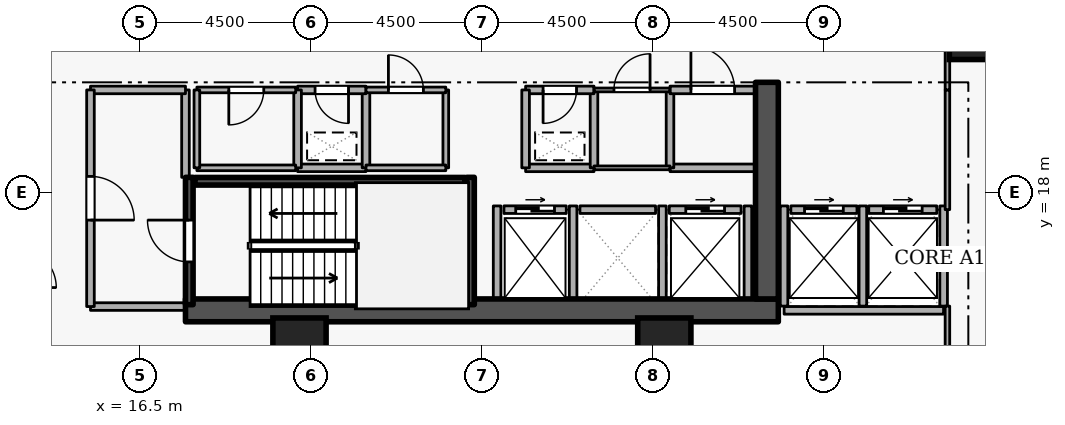
"""IFC4 building model, lengths in metres.
Left out: names, types, materials, properties, quantities, classifications, styles, units other than length and angle.
Written with IfcOpenShell. Run it as: python <this file> out.ifc"""

import sys

from ifc_helpers import new_model, si_unit, direction, frame, frame_2d, origin, origin_2d, place, context, subcontext, project, spatial, rectangle, extrude, element, fill, save


model = new_model("IFC4")
c1 = context("Model", 3, precision=1e-05, world=origin(), true_north=direction((0.0, 1.0)))
c2 = subcontext(c1, "Body", "Model", "MODEL_VIEW")
j1 = project(units=[si_unit("LENGTHUNIT", "METRE"), si_unit("PLANEANGLEUNIT", "RADIAN")], contexts=[c1])
p1 = place(None, origin())
s1 = spatial("IfcSite", under=j1, at=p1, CompositionType="ELEMENT")
p2 = place(p1, origin())
s2 = spatial("IfcBuilding", under=s1, at=p2, CompositionType="ELEMENT")
p3 = place(p2, frame((0.0, 0.0, 31.5)))
s3 = spatial("IfcBuildingStorey", under=s2, at=p3, CompositionType="ELEMENT", Elevation=31.5)
p4 = place(p3, frame((17.7, 14.9, 0.0), z_axis=(0.0, 0.0, 1.0), x_axis=(1.0, 0.0, 0.0)))
e1 = element("IfcWall", 1, at=p4, inside=s3, PredefinedType="SHEAR", context=c2, shape_type="SweptSolid", body=[
    extrude(rectangle(XDim=15.6, YDim=0.6, at=frame_2d((7.8, 0.0))), origin(), (0.0, 0.0, 1.0), 3.6),
])
p5 = place(p3, frame((33.0, 15.2, 0.0), z_axis=(0.0, 0.0, 1.0), x_axis=(0.0, 1.0, 0.0)))
e2 = element("IfcWall", 2, at=p5, inside=s3, PredefinedType="SHEAR", context=c2, shape_type="SweptSolid", body=[
    extrude(rectangle(XDim=5.7, YDim=0.6, at=frame_2d((2.85, 0.0))), origin(), (0.0, 0.0, 1.0), 3.6),
])
for number, where, z_axis, x_axis in (
    (3, (38.5, 22.2, 0.0), (0.0, 0.0, 1.0), (1.0, 0.0, 0.0)),
    (4, (20.7, 14.0, 0.0), (0.0, 0.0, 1.0), (1.0, 0.0, 0.0)),
    (5, (30.3, 14.0, 0.0), (0.0, 0.0, 1.0), (1.0, 0.0, 0.0)),
):
    element("IfcColumn", number, at=place(p3, frame(where, z_axis=z_axis, x_axis=x_axis)), inside=s3, PredefinedType="COLUMN", context=c2, shape_type="SweptSolid", body=[
        extrude(rectangle(XDim=1.4, YDim=1.4, at=origin_2d()), origin(), (0.0, 0.0, 1.0), 3.6),
    ])
p6 = place(p3, frame((26.08, 17.55, 0.0), z_axis=(0.0, 0.0, 1.0), x_axis=(1.0, 0.0, 0.0)))
e6 = element("IfcWall", 6, at=p6, inside=s3, PredefinedType="STANDARD", context=c2, shape_type="SweptSolid", body=[
    extrude(rectangle(XDim=1.64, YDim=0.2, at=frame_2d((0.82, 0.0))), origin(), (0.0, 0.0, 1.0), 3.34),
])
p7 = place(p6, frame((0.31, 0.0, 0.0)))
e7 = element("IfcOpeningElement", 7, at=p7, cuts=e6, PredefinedType="OPENING", context=c2, shape_type="SweptSolid", body=[
    extrude(rectangle(XDim=1.02, YDim=2.06, at=frame_2d((0.51, 1.03))), frame((0.0, 0.11, 0.0), z_axis=(0.0, -1.0, 0.0), x_axis=(1.0, 0.0, 0.0)), (0.0, 0.0, 1.0), 0.22),
])
p8 = place(p3, frame((28.08, 17.55, 0.0), z_axis=(0.0, 0.0, 1.0), x_axis=(1.0, 0.0, 0.0)))
e8 = element("IfcWall", 8, at=p8, inside=s3, PredefinedType="STANDARD", context=c2, shape_type="SweptSolid", body=[
    extrude(rectangle(XDim=1.99, YDim=0.2, at=frame_2d((0.995, 0.0))), origin(), (0.0, 0.0, 1.0), 3.34),
])
p9 = place(p3, frame((30.43, 17.55, 0.0), z_axis=(0.0, 0.0, 1.0), x_axis=(1.0, 0.0, 0.0)))
e9 = element("IfcWall", 9, at=p9, inside=s3, PredefinedType="STANDARD", context=c2, shape_type="SweptSolid", body=[
    extrude(rectangle(XDim=1.89, YDim=0.2, at=frame_2d((0.945, 0.0))), origin(), (0.0, 0.0, 1.0), 3.34),
])
p10 = place(p9, frame((0.435, 0.0, 0.0)))
e10 = element("IfcOpeningElement", 10, at=p10, cuts=e9, PredefinedType="OPENING", context=c2, shape_type="SweptSolid", body=[
    extrude(rectangle(XDim=1.02, YDim=2.06, at=frame_2d((0.51, 1.03))), frame((0.0, 0.11, 0.0), z_axis=(0.0, -1.0, 0.0), x_axis=(1.0, 0.0, 0.0)), (0.0, 0.0, 1.0), 0.22),
])
p11 = place(p3, frame((33.63, 17.55, 0.0), z_axis=(0.0, 0.0, 1.0), x_axis=(1.0, 0.0, 0.0)))
e11 = element("IfcWall", 11, at=p11, inside=s3, PredefinedType="STANDARD", context=c2, shape_type="SweptSolid", body=[
    extrude(rectangle(XDim=1.74, YDim=0.2, at=frame_2d((0.87, 0.0))), origin(), (0.0, 0.0, 1.0), 3.34),
])
p12 = place(p11, frame((0.36, 0.0, 0.0)))
e12 = element("IfcOpeningElement", 12, at=p12, cuts=e11, PredefinedType="OPENING", context=c2, shape_type="SweptSolid", body=[
    extrude(rectangle(XDim=1.02, YDim=2.06, at=frame_2d((0.51, 1.03))), frame((0.0, 0.11, 0.0), z_axis=(0.0, -1.0, 0.0), x_axis=(1.0, 0.0, 0.0)), (0.0, 0.0, 1.0), 0.22),
])
p13 = place(p3, frame((35.68, 17.55, 0.0), z_axis=(0.0, 0.0, 1.0), x_axis=(1.0, 0.0, 0.0)))
e13 = element("IfcWall", 13, at=p13, inside=s3, PredefinedType="STANDARD", context=c2, shape_type="SweptSolid", body=[
    extrude(rectangle(XDim=1.79, YDim=0.2, at=frame_2d((0.895, 0.0))), origin(), (0.0, 0.0, 1.0), 3.34),
])
p14 = place(p13, frame((0.385, 0.0, 0.0)))
e14 = element("IfcOpeningElement", 14, at=p14, cuts=e13, PredefinedType="OPENING", context=c2, shape_type="SweptSolid", body=[
    extrude(rectangle(XDim=1.02, YDim=2.06, at=frame_2d((0.51, 1.03))), frame((0.0, 0.11, 0.0), z_axis=(0.0, -1.0, 0.0), x_axis=(1.0, 0.0, 0.0)), (0.0, 0.0, 1.0), 0.22),
])
for number, where, z_axis, x_axis in (
    (15, (27.9, 15.212, 0.0), (0.0, 0.0, 1.0), (0.0, 1.0, 0.0)),
    (16, (25.9, 15.212, 0.0), (0.0, 0.0, 1.0), (0.0, 1.0, 0.0)),
    (17, (30.25, 15.212, 0.0), (0.0, 0.0, 1.0), (0.0, 1.0, 0.0)),
    (18, (32.5, 15.212, 0.0), (0.0, 0.0, 1.0), (0.0, 1.0, 0.0)),
):
    element("IfcWall", number, at=place(p3, frame(where, z_axis=z_axis, x_axis=x_axis)), inside=s3, PredefinedType="STANDARD", context=c2, shape_type="SweptSolid", body=[
        extrude(rectangle(XDim=2.436, YDim=0.2, at=frame_2d((1.218, 0.0))), origin(), (0.0, 0.0, 1.0), 3.34),
    ])
p15 = place(p3, frame((33.452, 14.9, 0.0), z_axis=(0.0, 0.0, 1.0), x_axis=(1.0, 0.0, 0.0)))
e19 = element("IfcWall", 19, at=p15, inside=s3, PredefinedType="STANDARD", context=c2, shape_type="SweptSolid", body=[
    extrude(rectangle(XDim=4.196, YDim=0.2, at=frame_2d((2.098, 0.0))), origin(), (0.0, 0.0, 1.0), 3.34),
])
for number, where, z_axis, x_axis in (
    (20, (35.525, 15.012, 0.0), (0.0, 0.0, 1.0), (0.0, 1.0, 0.0)),
    (21, (33.45, 15.012, 0.0), (0.0, 0.0, 1.0), (0.0, 1.0, 0.0)),
    (22, (37.65, 15.012, 0.0), (0.0, 0.0, 1.0), (0.0, 1.0, 0.0)),
):
    element("IfcWall", number, at=place(p3, frame(where, z_axis=z_axis, x_axis=x_axis)), inside=s3, PredefinedType="STANDARD", context=c2, shape_type="SweptSolid", body=[
        extrude(rectangle(XDim=2.636, YDim=0.2, at=frame_2d((1.318, 0.0))), origin(), (0.0, 0.0, 1.0), 3.34),
    ])
p16 = place(p3, frame((17.8, 15.05, 0.0), z_axis=(0.0, 0.0, 1.0), x_axis=(0.0, 1.0, 0.0)))
e23 = element("IfcWall", 23, at=p16, inside=s3, PredefinedType="SHEAR", context=c2, shape_type="SweptSolid", body=[
    extrude(rectangle(XDim=3.35, YDim=0.2, at=frame_2d((1.675, 0.0))), origin(), (0.0, 0.0, 1.0), 3.6),
])
p17 = place(p16, frame((1.125, 0.0, 0.0)))
e24 = element("IfcOpeningElement", 24, at=p17, cuts=e23, PredefinedType="OPENING", context=c2, shape_type="SweptSolid", body=[
    extrude(rectangle(XDim=1.1, YDim=2.1, at=frame_2d((0.55, 1.05))), frame((0.0, 0.11, 0.0), z_axis=(0.0, -1.0, 0.0), x_axis=(1.0, 0.0, 0.0)), (0.0, 0.0, 1.0), 0.22),
])
p18 = place(p3, frame((25.2, 18.4, 0.0), z_axis=(0.0, 0.0, 1.0), x_axis=(0.0, -1.0, 0.0)))
e25 = element("IfcWall", 25, at=p18, inside=s3, PredefinedType="SHEAR", context=c2, shape_type="SweptSolid", body=[
    extrude(rectangle(XDim=3.35, YDim=0.2, at=frame_2d((1.675, 0.0))), origin(), (0.0, 0.0, 1.0), 3.6),
])
p19 = place(p3, frame((25.05, 18.297, 0.0), z_axis=(0.0, 0.0, 1.0), x_axis=(-1.0, 0.0, 0.0)))
e26 = element("IfcWall", 26, at=p19, inside=s3, PredefinedType="SHEAR", context=c2, shape_type="SweptSolid", body=[
    extrude(rectangle(XDim=7.1, YDim=0.2, at=frame_2d((3.55, 0.0))), origin(), (0.0, 0.0, 1.0), 3.6),
])
p20 = place(p3, frame((15.2, 15.0, 0.0), z_axis=(0.0, 0.0, 1.0), x_axis=(1.0, 0.0, 0.0)))
e27 = element("IfcWall", 27, at=p20, inside=s3, PredefinedType="STANDARD", context=c2, shape_type="SweptSolid", body=[
    extrude(rectangle(XDim=2.5, YDim=0.2, at=frame_2d((1.25, 0.0))), origin(), (0.0, 0.0, 1.0), 3.34),
])
p21 = place(p3, frame((17.7, 18.4, 0.0), z_axis=(0.0, 0.0, 1.0), x_axis=(0.0, 1.0, 0.0)))
e28 = element("IfcWall", 28, at=p21, inside=s3, PredefinedType="STANDARD", context=c2, shape_type="SweptSolid", body=[
    extrude(rectangle(XDim=2.3, YDim=0.2, at=frame_2d((1.15, 0.0))), origin(), (0.0, 0.0, 1.0), 2.545),
])
p22 = place(p3, frame((17.7, 20.7, 0.0), z_axis=(0.0, 0.0, 1.0), x_axis=(-1.0, 0.0, 0.0)))
e29 = element("IfcWall", 29, at=p22, inside=s3, PredefinedType="STANDARD", context=c2, shape_type="SweptSolid", body=[
    extrude(rectangle(XDim=2.5, YDim=0.2, at=frame_2d((1.25, 0.0))), origin(), (0.0, 0.0, 1.0), 3.34),
])
p23 = place(p3, frame((15.2, 20.7, 0.0), z_axis=(0.0, 0.0, 1.0), x_axis=(0.0, -1.0, 0.0)))
e30 = element("IfcWall", 30, at=p23, inside=s3, PredefinedType="STANDARD", context=c2, shape_type="SweptSolid", body=[
    extrude(rectangle(XDim=5.7, YDim=0.2, at=frame_2d((2.85, 0.0))), origin(), (0.0, 0.0, 1.0), 3.34),
])
p24 = place(p23, frame((2.275, 0.0, 0.0)))
e31 = element("IfcOpeningElement", 31, at=p24, cuts=e30, PredefinedType="OPENING", context=c2, shape_type="SweptSolid", body=[
    extrude(rectangle(XDim=1.15, YDim=2.1, at=frame_2d((0.575, 1.05))), frame((0.0, 0.11, 0.0), z_axis=(0.0, -1.0, 0.0), x_axis=(1.0, 0.0, 0.0)), (0.0, 0.0, 1.0), 0.22),
])
p25 = place(p3, frame((26.65, 18.65, 0.0), z_axis=(0.0, 0.0, 1.0), x_axis=(1.0, 0.0, 0.0)))
e32 = element("IfcWall", 32, at=p25, inside=s3, PredefinedType="STANDARD", context=c2, shape_type="SweptSolid", body=[
    extrude(rectangle(XDim=1.8, YDim=0.2, at=frame_2d((0.9, 0.0))), origin(), (0.0, 0.0, 1.0), 3.34),
])
p26 = place(p3, frame((28.45, 18.65, 0.0), z_axis=(0.0, 0.0, 1.0), x_axis=(0.0, 1.0, 0.0)))
e33 = element("IfcWall", 33, at=p26, inside=s3, PredefinedType="STANDARD", context=c2, shape_type="SweptSolid", body=[
    extrude(rectangle(XDim=2.05, YDim=0.2, at=frame_2d((1.025, 0.0))), origin(), (0.0, 0.0, 1.0), 3.34),
])
p27 = place(p3, frame((28.45, 20.7, 0.0), z_axis=(0.0, 0.0, 1.0), x_axis=(-1.0, 0.0, 0.0)))
e34 = element("IfcWall", 34, at=p27, inside=s3, PredefinedType="STANDARD", context=c2, shape_type="SweptSolid", body=[
    extrude(rectangle(XDim=1.8, YDim=0.2, at=frame_2d((0.9, 0.0))), origin(), (0.0, 0.0, 1.0), 3.34),
])
p28 = place(p27, frame((0.46, 0.0, 0.0)))
e35 = element("IfcOpeningElement", 35, at=p28, cuts=e34, PredefinedType="OPENING", context=c2, shape_type="SweptSolid", body=[
    extrude(rectangle(XDim=0.88, YDim=2.04, at=frame_2d((0.44, 1.02))), frame((0.0, 0.11, 0.0), z_axis=(0.0, -1.0, 0.0), x_axis=(1.0, 0.0, 0.0)), (0.0, 0.0, 1.0), 0.22),
])
p29 = place(p3, frame((26.65, 20.7, 0.0), z_axis=(0.0, 0.0, 1.0), x_axis=(0.0, -1.0, 0.0)))
e36 = element("IfcWall", 36, at=p29, inside=s3, PredefinedType="STANDARD", context=c2, shape_type="SweptSolid", body=[
    extrude(rectangle(XDim=2.05, YDim=0.2, at=frame_2d((1.025, 0.0))), origin(), (0.0, 0.0, 1.0), 3.34),
])
p30 = place(p3, frame((20.65, 18.65, 0.0), z_axis=(0.0, 0.0, 1.0), x_axis=(1.0, 0.0, 0.0)))
e37 = element("IfcWall", 37, at=p30, inside=s3, PredefinedType="STANDARD", context=c2, shape_type="SweptSolid", body=[
    extrude(rectangle(XDim=1.8, YDim=0.2, at=frame_2d((0.9, 0.0))), origin(), (0.0, 0.0, 1.0), 3.34),
])
p31 = place(p3, frame((22.45, 18.65, 0.0), z_axis=(0.0, 0.0, 1.0), x_axis=(0.0, 1.0, 0.0)))
e38 = element("IfcWall", 38, at=p31, inside=s3, PredefinedType="STANDARD", context=c2, shape_type="SweptSolid", body=[
    extrude(rectangle(XDim=2.05, YDim=0.2, at=frame_2d((1.025, 0.0))), origin(), (0.0, 0.0, 1.0), 3.34),
])
p32 = place(p3, frame((22.45, 20.7, 0.0), z_axis=(0.0, 0.0, 1.0), x_axis=(-1.0, 0.0, 0.0)))
e39 = element("IfcWall", 39, at=p32, inside=s3, PredefinedType="STANDARD", context=c2, shape_type="SweptSolid", body=[
    extrude(rectangle(XDim=1.8, YDim=0.2, at=frame_2d((0.9, 0.0))), origin(), (0.0, 0.0, 1.0), 3.34),
])
p33 = place(p32, frame((0.46, 0.0, 0.0)))
e40 = element("IfcOpeningElement", 40, at=p33, cuts=e39, PredefinedType="OPENING", context=c2, shape_type="SweptSolid", body=[
    extrude(rectangle(XDim=0.88, YDim=2.04, at=frame_2d((0.44, 1.02))), frame((0.0, 0.11, 0.0), z_axis=(0.0, -1.0, 0.0), x_axis=(1.0, 0.0, 0.0)), (0.0, 0.0, 1.0), 0.22),
])
p34 = place(p3, frame((20.65, 20.7, 0.0), z_axis=(0.0, 0.0, 1.0), x_axis=(0.0, -1.0, 0.0)))
e41 = element("IfcWall", 41, at=p34, inside=s3, PredefinedType="STANDARD", context=c2, shape_type="SweptSolid", body=[
    extrude(rectangle(XDim=2.05, YDim=0.2, at=frame_2d((1.025, 0.0))), origin(), (0.0, 0.0, 1.0), 3.34),
])
p35 = place(p3, frame((32.7, 18.65, 0.0), z_axis=(0.0, 0.0, 1.0), x_axis=(-1.0, 0.0, 0.0)))
e42 = element("IfcWall", 42, at=p35, inside=s3, PredefinedType="STANDARD", context=c2, shape_type="SweptSolid", body=[
    extrude(rectangle(XDim=2.25, YDim=0.2, at=frame_2d((1.125, 0.0))), origin(), (0.0, 0.0, 1.0), 3.34),
])
p36 = place(p3, frame((30.45, 18.65, 0.0), z_axis=(0.0, 0.0, 1.0), x_axis=(0.0, 1.0, 0.0)))
e43 = element("IfcWall", 43, at=p36, inside=s3, PredefinedType="STANDARD", context=c2, shape_type="SweptSolid", body=[
    extrude(rectangle(XDim=2.05, YDim=0.2, at=frame_2d((1.025, 0.0))), origin(), (0.0, 0.0, 1.0), 3.34),
])
p37 = place(p3, frame((30.45, 20.7, 0.0), z_axis=(0.0, 0.0, 1.0), x_axis=(1.0, 0.0, 0.0)))
e44 = element("IfcWall", 44, at=p37, inside=s3, PredefinedType="STANDARD", context=c2, shape_type="SweptSolid", body=[
    extrude(rectangle(XDim=2.25, YDim=0.2, at=frame_2d((1.125, 0.0))), origin(), (0.0, 0.0, 1.0), 3.34),
])
p38 = place(p37, frame((0.55, 0.0, 0.0)))
e45 = element("IfcOpeningElement", 45, at=p38, cuts=e44, PredefinedType="OPENING", context=c2, shape_type="SweptSolid", body=[
    extrude(rectangle(XDim=1.15, YDim=2.1, at=frame_2d((0.575, 1.05))), frame((0.0, 0.11, 0.0), z_axis=(0.0, -1.0, 0.0), x_axis=(1.0, 0.0, 0.0)), (0.0, 0.0, 1.0), 0.22),
])
p39 = place(p3, frame((18.0, 18.65, 0.0), z_axis=(0.0, 0.0, 1.0), x_axis=(1.0, 0.0, 0.0)))
e46 = element("IfcWall", 46, at=p39, inside=s3, PredefinedType="PARTITIONING", context=c2, shape_type="SweptSolid", body=[
    extrude(rectangle(XDim=2.6, YDim=0.15, at=frame_2d((1.3, 0.0))), origin(), (0.0, 0.0, 1.0), 3.34),
])
p40 = place(p3, frame((20.6, 20.7, 0.0), z_axis=(0.0, 0.0, 1.0), x_axis=(-1.0, 0.0, 0.0)))
e47 = element("IfcWall", 47, at=p40, inside=s3, PredefinedType="PARTITIONING", context=c2, shape_type="SweptSolid", body=[
    extrude(rectangle(XDim=2.6, YDim=0.15, at=frame_2d((1.3, 0.0))), origin(), (0.0, 0.0, 1.0), 3.34),
])
p41 = place(p40, frame((0.84, 0.0, 0.0)))
e48 = element("IfcOpeningElement", 48, at=p41, cuts=e47, PredefinedType="OPENING", context=c2, shape_type="SweptSolid", body=[
    extrude(rectangle(XDim=0.92, YDim=2.08, at=frame_2d((0.46, 1.04))), frame((0.0, 0.085, 0.0), z_axis=(0.0, -1.0, 0.0), x_axis=(1.0, 0.0, 0.0)), (0.0, 0.0, 1.0), 0.17),
])
p42 = place(p3, frame((18.0, 20.7, 0.0), z_axis=(0.0, 0.0, 1.0), x_axis=(0.0, -1.0, 0.0)))
e49 = element("IfcWall", 49, at=p42, inside=s3, PredefinedType="PARTITIONING", context=c2, shape_type="SweptSolid", body=[
    extrude(rectangle(XDim=2.05, YDim=0.15, at=frame_2d((1.025, 0.0))), origin(), (0.0, 0.0, 1.0), 2.545),
])
p43 = place(p3, frame((24.55, 20.7, 0.0), z_axis=(0.0, 0.0, 1.0), x_axis=(0.0, -1.0, 0.0)))
e50 = element("IfcWall", 50, at=p43, inside=s3, PredefinedType="PARTITIONING", context=c2, shape_type="SweptSolid", body=[
    extrude(rectangle(XDim=2.05, YDim=0.15, at=frame_2d((1.025, 0.0))), origin(), (0.0, 0.0, 1.0), 3.34),
])
p44 = place(p3, frame((24.55, 18.65, 0.0), z_axis=(0.0, 0.0, 1.0), x_axis=(-1.0, 0.0, 0.0)))
e51 = element("IfcWall", 51, at=p44, inside=s3, PredefinedType="PARTITIONING", context=c2, shape_type="SweptSolid", body=[
    extrude(rectangle(XDim=2.1, YDim=0.15, at=frame_2d((1.05, 0.0))), origin(), (0.0, 0.0, 1.0), 3.34),
])
p45 = place(p3, frame((22.45, 20.7, 0.0), z_axis=(0.0, 0.0, 1.0), x_axis=(1.0, 0.0, 0.0)))
e52 = element("IfcWall", 52, at=p45, inside=s3, PredefinedType="PARTITIONING", context=c2, shape_type="SweptSolid", body=[
    extrude(rectangle(XDim=2.1, YDim=0.15, at=frame_2d((1.05, 0.0))), origin(), (0.0, 0.0, 1.0), 3.34),
])
p46 = place(p45, frame((0.59, 0.0, 0.0)))
e53 = element("IfcOpeningElement", 53, at=p46, cuts=e52, PredefinedType="OPENING", context=c2, shape_type="SweptSolid", body=[
    extrude(rectangle(XDim=0.92, YDim=2.08, at=frame_2d((0.46, 1.04))), frame((0.0, 0.085, 0.0), z_axis=(0.0, -1.0, 0.0), x_axis=(1.0, 0.0, 0.0)), (0.0, 0.0, 1.0), 0.17),
])
p47 = place(p3, frame((30.45, 18.65, 0.0), z_axis=(0.0, 0.0, 1.0), x_axis=(-1.0, 0.0, 0.0)))
e54 = element("IfcWall", 54, at=p47, inside=s3, PredefinedType="PARTITIONING", context=c2, shape_type="SweptSolid", body=[
    extrude(rectangle(XDim=2.0, YDim=0.1, at=frame_2d((1.0, 0.0))), origin(), (0.0, 0.0, 1.0), 3.34),
])
p48 = place(p3, frame((28.45, 20.7, 0.0), z_axis=(0.0, 0.0, 1.0), x_axis=(1.0, 0.0, 0.0)))
e55 = element("IfcWall", 55, at=p48, inside=s3, PredefinedType="PARTITIONING", context=c2, shape_type="SweptSolid", body=[
    extrude(rectangle(XDim=2.0, YDim=0.1, at=frame_2d((1.0, 0.0))), origin(), (0.0, 0.0, 1.0), 3.34),
])
p49 = place(p48, frame((0.525, 0.0, 0.0)))
e56 = element("IfcOpeningElement", 56, at=p49, cuts=e55, PredefinedType="OPENING", context=c2, shape_type="SweptSolid", body=[
    extrude(rectangle(XDim=0.95, YDim=2.1, at=frame_2d((0.475, 1.05))), frame((0.0, 0.06, 0.0), z_axis=(0.0, -1.0, 0.0), x_axis=(1.0, 0.0, 0.0)), (0.0, 0.0, 1.0), 0.12),
])
p50 = place(p3, frame((37.75, 17.55, 0.0), z_axis=(0.0, 0.0, 1.0), x_axis=(0.0, 1.0, 0.0)))
e57 = element("IfcWall", 57, at=p50, inside=s3, PredefinedType="PARTITIONING", context=c2, shape_type="SweptSolid", body=[
    extrude(rectangle(XDim=3.15, YDim=0.12, at=frame_2d((1.575, 0.0))), origin(), (0.0, 0.0, 1.0), 3.34),
])
p51 = place(p3, frame((37.75, 20.7, 0.0), z_axis=(0.0, 0.0, 1.0), x_axis=(0.0, 1.0, 0.0)))
e58 = element("IfcWall", 58, at=p51, inside=s3, PredefinedType="PARTITIONING", context=c2, shape_type="SweptSolid", body=[
    extrude(rectangle(XDim=1.85, YDim=0.12, at=frame_2d((0.925, 0.0))), origin(), (0.0, 0.0, 1.0), 3.34),
])
p52 = place(p3, frame((37.75, 13.15, 0.0), z_axis=(0.0, 0.0, 1.0), x_axis=(0.0, 1.0, 0.0)))
e59 = element("IfcWall", 59, at=p52, inside=s3, PredefinedType="PARTITIONING", context=c2, shape_type="SweptSolid", body=[
    extrude(rectangle(XDim=1.862, YDim=0.12, at=frame_2d((0.931, 0.0))), origin(), (0.0, 0.0, 1.0), 3.34),
])
p53 = place(p7, origin())
e60 = element("IfcDoor", 60, at=p53, inside=s3, OperationType="SLIDING_TO_LEFT", PredefinedType="DOOR", context=c2, shape_type="SweptSolid", body=[
    extrude(rectangle(XDim=1.02, YDim=2.06, at=frame_2d((0.51, 1.03))), frame((0.0, 0.025, 0.0), z_axis=(0.0, -1.0, 0.0), x_axis=(1.0, 0.0, 0.0)), (0.0, 0.0, 1.0), 0.05),
])
fill(e7, e60)
p54 = place(p10, origin())
e61 = element("IfcDoor", 61, at=p54, inside=s3, OperationType="SLIDING_TO_LEFT", PredefinedType="DOOR", context=c2, shape_type="SweptSolid", body=[
    extrude(rectangle(XDim=1.02, YDim=2.06, at=frame_2d((0.51, 1.03))), frame((0.0, 0.025, 0.0), z_axis=(0.0, -1.0, 0.0), x_axis=(1.0, 0.0, 0.0)), (0.0, 0.0, 1.0), 0.05),
])
fill(e10, e61)
p55 = place(p12, origin())
e62 = element("IfcDoor", 62, at=p55, inside=s3, OperationType="SLIDING_TO_LEFT", PredefinedType="DOOR", context=c2, shape_type="SweptSolid", body=[
    extrude(rectangle(XDim=1.02, YDim=2.06, at=frame_2d((0.51, 1.03))), frame((0.0, 0.025, 0.0), z_axis=(0.0, -1.0, 0.0), x_axis=(1.0, 0.0, 0.0)), (0.0, 0.0, 1.0), 0.05),
])
fill(e12, e62)
p56 = place(p14, origin())
e63 = element("IfcDoor", 63, at=p56, inside=s3, OperationType="SLIDING_TO_LEFT", PredefinedType="DOOR", context=c2, shape_type="SweptSolid", body=[
    extrude(rectangle(XDim=1.02, YDim=2.06, at=frame_2d((0.51, 1.03))), frame((0.0, 0.025, 0.0), z_axis=(0.0, -1.0, 0.0), x_axis=(1.0, 0.0, 0.0)), (0.0, 0.0, 1.0), 0.05),
])
fill(e14, e63)
p57 = place(p17, origin())
e64 = element("IfcDoor", 64, at=p57, inside=s3, OperationType="SINGLE_SWING_RIGHT", PredefinedType="DOOR", context=c2, shape_type="SweptSolid", body=[
    extrude(rectangle(XDim=1.1, YDim=2.1, at=frame_2d((0.55, 1.05))), frame((0.0, 0.025, 0.0), z_axis=(0.0, -1.0, 0.0), x_axis=(1.0, 0.0, 0.0)), (0.0, 0.0, 1.0), 0.05),
])
fill(e24, e64)
p58 = place(p24, origin())
e65 = element("IfcDoor", 65, at=p58, inside=s3, OperationType="SINGLE_SWING_RIGHT", PredefinedType="DOOR", context=c2, shape_type="SweptSolid", body=[
    extrude(rectangle(XDim=1.15, YDim=2.1, at=frame_2d((0.575, 1.05))), frame((0.0, 0.025, 0.0), z_axis=(0.0, -1.0, 0.0), x_axis=(1.0, 0.0, 0.0)), (0.0, 0.0, 1.0), 0.05),
])
fill(e31, e65)
p59 = place(p28, origin())
e66 = element("IfcDoor", 66, at=p59, inside=s3, OperationType="SINGLE_SWING_RIGHT", PredefinedType="DOOR", context=c2, shape_type="SweptSolid", body=[
    extrude(rectangle(XDim=0.88, YDim=2.04, at=frame_2d((0.44, 1.02))), frame((0.0, 0.025, 0.0), z_axis=(0.0, -1.0, 0.0), x_axis=(1.0, 0.0, 0.0)), (0.0, 0.0, 1.0), 0.05),
])
fill(e35, e66)
p60 = place(p33, origin())
e67 = element("IfcDoor", 67, at=p60, inside=s3, OperationType="SINGLE_SWING_LEFT", PredefinedType="DOOR", context=c2, shape_type="SweptSolid", body=[
    extrude(rectangle(XDim=0.88, YDim=2.04, at=frame_2d((0.44, 1.02))), frame((0.0, 0.025, 0.0), z_axis=(0.0, -1.0, 0.0), x_axis=(1.0, 0.0, 0.0)), (0.0, 0.0, 1.0), 0.05),
])
fill(e40, e67)
p61 = place(p41, origin())
e68 = element("IfcDoor", 68, at=p61, inside=s3, OperationType="SINGLE_SWING_RIGHT", PredefinedType="DOOR", context=c2, shape_type="SweptSolid", body=[
    extrude(rectangle(XDim=0.92, YDim=2.08, at=frame_2d((0.46, 1.04))), frame((0.0, 0.025, 0.0), z_axis=(0.0, -1.0, 0.0), x_axis=(1.0, 0.0, 0.0)), (0.0, 0.0, 1.0), 0.05),
])
fill(e48, e68)
p62 = place(p46, origin())
e69 = element("IfcDoor", 69, at=p62, inside=s3, OperationType="SINGLE_SWING_LEFT", PredefinedType="DOOR", context=c2, shape_type="SweptSolid", body=[
    extrude(rectangle(XDim=0.92, YDim=2.08, at=frame_2d((0.46, 1.04))), frame((0.0, 0.025, 0.0), z_axis=(0.0, -1.0, 0.0), x_axis=(1.0, 0.0, 0.0)), (0.0, 0.0, 1.0), 0.05),
])
fill(e53, e69)
p63 = place(p49, origin())
e70 = element("IfcDoor", 70, at=p63, inside=s3, OperationType="SINGLE_SWING_RIGHT", PredefinedType="DOOR", context=c2, shape_type="SweptSolid", body=[
    extrude(rectangle(XDim=0.95, YDim=2.1, at=frame_2d((0.475, 1.05))), frame((0.0, 0.025, 0.0), z_axis=(0.0, -1.0, 0.0), x_axis=(1.0, 0.0, 0.0)), (0.0, 0.0, 1.0), 0.05),
])
fill(e56, e70)
p64 = place(p38, origin())
e71 = element("IfcDoor", 71, at=p64, inside=s3, OperationType="SINGLE_SWING_LEFT", PredefinedType="DOOR", context=c2, shape_type="SweptSolid", body=[
    extrude(rectangle(XDim=1.15, YDim=2.1, at=frame_2d((0.575, 1.05))), frame((0.0, 0.025, 0.0), z_axis=(0.0, -1.0, 0.0), x_axis=(1.0, 0.0, 0.0)), (0.0, 0.0, 1.0), 0.05),
])
fill(e45, e71)
save(model, sys.argv[1])
